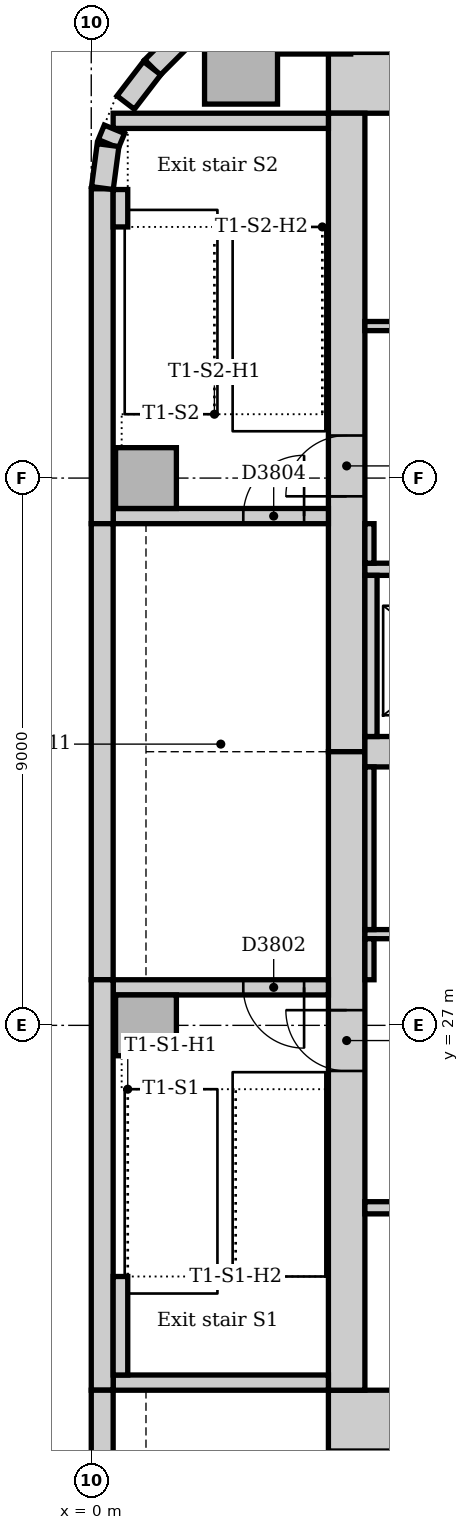
"""IFC4 building model, lengths in metres.
Left out: names, types, materials, properties, quantities, classifications, styles, units other than length and angle.
Written with IfcOpenShell. Run it as: python <this file> out.ifc"""

import sys

from ifc_helpers import new_model, si_unit, direction, frame, frame_2d, origin, origin_2d, place, context, subcontext, project, spatial, rectangle, extrude, element, fill, save


model = new_model("IFC4")
c1 = context("Model", 3, precision=1e-05, world=origin(), true_north=direction((0.0, 1.0)))
c2 = subcontext(c1, "Body", "Model", "MODEL_VIEW")
j1 = project(units=[si_unit("LENGTHUNIT", "METRE"), si_unit("PLANEANGLEUNIT", "RADIAN")], contexts=[c1])
p1 = place(None, origin())
s1 = spatial("IfcSite", under=j1, at=p1, CompositionType="ELEMENT")
p2 = place(p1, origin())
s2 = spatial("IfcBuilding", under=s1, at=p2, CompositionType="ELEMENT")
p3 = place(p2, frame((0.0, 0.0, 87.0)))
s3 = spatial("IfcBuildingStorey", under=s2, at=p3, CompositionType="ELEMENT", Elevation=87.0)
for number, where, z_axis, x_axis in (
    (1, (3.9, 20.5, 0.0), (0.0, 0.0, 1.0), (1.0, 0.0, 0.0)),
    (2, (23.5, 42.5, 0.0), (0.0, 0.0, 1.0), (-1.0, 0.0, 0.0)),
):
    element("IfcWall", number, at=place(p3, frame(where, z_axis=z_axis, x_axis=x_axis)), inside=s3, PredefinedType="SOLIDWALL", context=c2, shape_type="SweptSolid", body=[
        extrude(rectangle(XDim=19.6, YDim=1.0, at=frame_2d((9.8, 0.0))), origin(), (0.0, 0.0, 1.0), 4.0),
    ])
p4 = place(p3, frame((4.2, 42.0, 0.0), z_axis=(0.0, 0.0, 1.0), x_axis=(0.0, -1.0, 0.0)))
e3 = element("IfcWall", 3, at=p4, inside=s3, PredefinedType="SOLIDWALL", context=c2, shape_type="SweptSolid", body=[
    extrude(rectangle(XDim=10.5, YDim=0.6, at=frame_2d((5.25, 0.0))), origin(), (0.0, 0.0, 1.0), 4.0),
])
p5 = place(p4, frame((5.3, 0.0, 0.0)))
e4 = element("IfcOpeningElement", 4, at=p5, cuts=e3, PredefinedType="OPENING", context=c2, shape_type="SweptSolid", body=[
    extrude(rectangle(XDim=1.0, YDim=2.1, at=frame_2d((0.5, 1.05))), frame((0.0, 0.31, 0.0), z_axis=(0.0, -1.0, 0.0), x_axis=(1.0, 0.0, 0.0)), (0.0, 0.0, 1.0), 0.62),
])
p6 = place(p3, frame((4.2, 31.5, 0.0), z_axis=(0.0, 0.0, 1.0), x_axis=(0.0, -1.0, 0.0)))
e5 = element("IfcWall", 5, at=p6, inside=s3, PredefinedType="SOLIDWALL", context=c2, shape_type="SweptSolid", body=[
    extrude(rectangle(XDim=10.5, YDim=0.6, at=frame_2d((5.25, 0.0))), origin(), (0.0, 0.0, 1.0), 4.0),
])
p7 = place(p6, frame((4.25, 0.0, 0.0)))
e6 = element("IfcOpeningElement", 6, at=p7, cuts=e5, PredefinedType="OPENING", context=c2, shape_type="SweptSolid", body=[
    extrude(rectangle(XDim=1.0, YDim=2.1, at=frame_2d((0.5, 1.05))), frame((0.0, 0.31, 0.0), z_axis=(0.0, -1.0, 0.0), x_axis=(1.0, 0.0, 0.0)), (0.0, 0.0, 1.0), 0.62),
])
p8 = place(p3, frame((4.5, 31.5, 0.0), z_axis=(0.0, 0.0, 1.0), x_axis=(1.0, 0.0, 0.0)))
e7 = element("IfcWall", 7, at=p8, inside=s3, PredefinedType="SOLIDWALL", context=c2, shape_type="SweptSolid", body=[
    extrude(rectangle(XDim=18.0, YDim=0.5, at=frame_2d((9.0, 0.0))), origin(), (0.0, 0.0, 1.0), 4.0),
])
p9 = place(p3, frame((0.36, 21.125, 0.0), z_axis=(0.0, 0.0, 1.0), x_axis=(1.0, 0.0, 0.0)))
e8 = element("IfcWall", 8, at=p9, inside=s3, PredefinedType="SOLIDWALL", context=c2, shape_type="SweptSolid", body=[
    extrude(rectangle(XDim=3.54, YDim=0.25, at=frame_2d((1.77, 0.0))), origin(), (0.0, 0.0, 1.0), 4.0),
])
p10 = place(p3, frame((3.9, 27.625, 0.0), z_axis=(0.0, 0.0, 1.0), x_axis=(-1.0, 0.0, 0.0)))
e9 = element("IfcWall", 9, at=p10, inside=s3, PredefinedType="SOLIDWALL", context=c2, shape_type="SweptSolid", body=[
    extrude(rectangle(XDim=3.54, YDim=0.25, at=frame_2d((1.77, 0.0))), origin(), (0.0, 0.0, 1.0), 4.0),
])
p11 = place(p10, frame((0.4, 0.0, 0.0)))
e10 = element("IfcOpeningElement", 10, at=p11, cuts=e9, PredefinedType="OPENING", context=c2, shape_type="SweptSolid", body=[
    extrude(rectangle(XDim=1.0, YDim=2.1, at=frame_2d((0.5, 1.05))), frame((0.0, 0.135, 0.0), z_axis=(0.0, -1.0, 0.0), x_axis=(1.0, 0.0, 0.0)), (0.0, 0.0, 1.0), 0.27),
])
p12 = place(p3, frame((0.36, 35.375, 0.0), z_axis=(0.0, 0.0, 1.0), x_axis=(1.0, 0.0, 0.0)))
e11 = element("IfcWall", 11, at=p12, inside=s3, PredefinedType="SOLIDWALL", context=c2, shape_type="SweptSolid", body=[
    extrude(rectangle(XDim=3.54, YDim=0.25, at=frame_2d((1.77, 0.0))), origin(), (0.0, 0.0, 1.0), 4.0),
])
p13 = place(p12, frame((2.14, 0.0, 0.0)))
e12 = element("IfcOpeningElement", 12, at=p13, cuts=e11, PredefinedType="OPENING", context=c2, shape_type="SweptSolid", body=[
    extrude(rectangle(XDim=1.0, YDim=2.1, at=frame_2d((0.5, 1.05))), frame((0.0, 0.135, 0.0), z_axis=(0.0, -1.0, 0.0), x_axis=(1.0, 0.0, 0.0)), (0.0, 0.0, 1.0), 0.27),
])
p14 = place(p3, frame((3.9, 41.875, 0.0), z_axis=(0.0, 0.0, 1.0), x_axis=(-1.0, 0.0, 0.0)))
e13 = element("IfcWall", 13, at=p14, inside=s3, PredefinedType="SOLIDWALL", context=c2, shape_type="SweptSolid", body=[
    extrude(rectangle(XDim=3.54, YDim=0.25, at=frame_2d((1.77, 0.0))), origin(), (0.0, 0.0, 1.0), 4.0),
])
for number, where, z_axis, x_axis in (
    (14, (3.667, 43.574, 0.0), (0.0, 0.0, 1.0), (1.0, 0.0, 0.0)),
    (15, (2.463, 42.75, 0.0), (0.0, 0.0, 1.0), (1.0, 0.0, 0.0)),
):
    element("IfcColumn", number, at=place(p3, frame(where, z_axis=z_axis, x_axis=x_axis)), inside=s3, PredefinedType="COLUMN", context=c2, shape_type="SweptSolid", body=[
        extrude(rectangle(XDim=1.2, YDim=1.2, at=origin_2d()), origin(), (0.0, 0.0, 1.0), 3.85),
    ])
for number, where, z_axis, x_axis in (
    (16, (0.9, 27.0, 0.0), (0.0, 0.0, 1.0), (1.0, 0.0, 0.0)),
    (17, (0.9, 36.0, 0.0), (0.0, 0.0, 1.0), (1.0, 0.0, 0.0)),
):
    element("IfcColumn", number, at=place(p3, frame(where, z_axis=z_axis, x_axis=x_axis)), inside=s3, PredefinedType="COLUMN", context=c2, shape_type="SweptSolid", body=[
        extrude(rectangle(XDim=1.0, YDim=1.0, at=origin_2d()), origin(), (0.0, 0.0, 1.0), 4.0),
    ])
p15 = place(p3, frame((2.249, 43.994, 0.0), z_axis=(0.0, 0.0, 1.0), x_axis=(-0.707106781187, -0.707106781187, 0.0)))
e18 = element("IfcWall", 18, at=p15, inside=s3, PredefinedType="STANDARD", context=c2, shape_type="SweptSolid", body=[
    extrude(rectangle(XDim=1.757, YDim=0.36, at=frame_2d((0.879, 0.0))), origin(), (0.0, 0.0, 1.0), 3.85),
])
p16 = place(p3, frame((0.18, 40.757, 0.0), z_axis=(0.0, 0.0, 1.0), x_axis=(0.0, -1.0, 0.0)))
e19 = element("IfcWall", 19, at=p16, inside=s3, PredefinedType="STANDARD", context=c2, shape_type="SweptSolid", body=[
    extrude(rectangle(XDim=5.507, YDim=0.36, at=frame_2d((2.754, 0.0))), origin(), (0.0, 0.0, 1.0), 3.85),
])
p17 = place(p3, frame((0.18, 35.25, 0.0), z_axis=(0.0, 0.0, 1.0), x_axis=(0.0, -1.0, 0.0)))
e20 = element("IfcWall", 20, at=p17, inside=s3, PredefinedType="STANDARD", context=c2, shape_type="SweptSolid", body=[
    extrude(rectangle(XDim=7.5, YDim=0.36, at=frame_2d((3.75, 0.0))), origin(), (0.0, 0.0, 1.0), 3.85),
])
p18 = place(p3, frame((0.18, 27.75, 0.0), z_axis=(0.0, 0.0, 1.0), x_axis=(0.0, -1.0, 0.0)))
e21 = element("IfcWall", 21, at=p18, inside=s3, PredefinedType="STANDARD", context=c2, shape_type="SweptSolid", body=[
    extrude(rectangle(XDim=6.75, YDim=0.36, at=frame_2d((3.375, 0.0))), origin(), (0.0, 0.0, 1.0), 3.85),
])
p19 = place(p3, frame((0.18, 21.0, 0.0), z_axis=(0.0, 0.0, 1.0), x_axis=(0.0, -1.0, 0.0)))
e22 = element("IfcWall", 22, at=p19, inside=s3, PredefinedType="STANDARD", context=c2, shape_type="SweptSolid", body=[
    extrude(rectangle(XDim=16.757, YDim=0.36, at=frame_2d((8.379, 0.0))), origin(), (0.0, 0.0, 1.0), 3.85),
])
p20 = place(p19, frame((1.35, 0.0, 0.9)))
e23 = element("IfcOpeningElement", 23, at=p20, cuts=e22, PredefinedType="OPENING", context=c2, shape_type="SweptSolid", body=[
    extrude(rectangle(XDim=3.3, YDim=1.6, at=frame_2d((1.65, 0.8))), frame((0.0, 0.19, 0.0), z_axis=(0.0, -1.0, 0.0), x_axis=(1.0, 0.0, 0.0)), (0.0, 0.0, 1.0), 0.38),
])
p21 = place(p19, frame((5.85, 0.0, 0.9)))
e24 = element("IfcOpeningElement", 24, at=p21, cuts=e22, PredefinedType="OPENING", context=c2, shape_type="SweptSolid", body=[
    extrude(rectangle(XDim=3.3, YDim=1.6, at=frame_2d((1.65, 0.8))), frame((0.0, 0.19, 0.0), z_axis=(0.0, -1.0, 0.0), x_axis=(1.0, 0.0, 0.0)), (0.0, 0.0, 1.0), 0.38),
])
p22 = place(p19, frame((10.35, 0.0, 0.9)))
e25 = element("IfcOpeningElement", 25, at=p22, cuts=e22, PredefinedType="OPENING", context=c2, shape_type="SweptSolid", body=[
    extrude(rectangle(XDim=3.3, YDim=1.6, at=frame_2d((1.65, 0.8))), frame((0.0, 0.19, 0.0), z_axis=(0.0, -1.0, 0.0), x_axis=(1.0, 0.0, 0.0)), (0.0, 0.0, 1.0), 0.38),
])
p23 = place(p3, frame((1.0, 42.741, 0.0), z_axis=(0.0, 0.0, 1.0), x_axis=(-0.608802368033, -0.793321924995, 0.0)))
e26 = element("IfcWall", 26, at=p23, inside=s3, PredefinedType="STANDARD", context=c2, shape_type="SweptSolid", body=[
    extrude(rectangle(XDim=0.713, YDim=0.36, at=frame_2d((0.357, 0.0))), origin(), (0.0, 0.0, 1.0), 3.85),
])
p24 = place(p3, frame((0.381, 41.736, 0.0), z_axis=(0.0, 0.0, 1.0), x_axis=(-0.382773360986, -0.923842277729, 0.0)))
e27 = element("IfcWall", 27, at=p24, inside=s3, PredefinedType="STANDARD", context=c2, shape_type="SweptSolid", body=[
    extrude(rectangle(XDim=0.258, YDim=0.36, at=frame_2d((0.129, 0.0))), origin(), (0.0, 0.0, 1.0), 3.85),
])
p25 = place(p3, frame((0.276, 41.476, 0.0), z_axis=(0.0, 0.0, 1.0), x_axis=(-0.13055608231, -0.99144092581, 0.0)))
e28 = element("IfcWall", 28, at=p25, inside=s3, PredefinedType="STANDARD", context=c2, shape_type="SweptSolid", body=[
    extrude(rectangle(XDim=0.713, YDim=0.36, at=frame_2d((0.356, 0.0))), origin(), (0.0, 0.0, 1.0), 3.85),
])
p26 = place(p3, frame((0.48, 21.25, 0.0), z_axis=(0.0, 0.0, 1.0), x_axis=(0.0, 1.0, 0.0)))
e29 = element("IfcWall", 29, at=p26, inside=s3, PredefinedType="STANDARD", context=c2, shape_type="SweptSolid", body=[
    extrude(rectangle(XDim=1.62, YDim=0.24, at=frame_2d((0.81, 0.0))), origin(), (0.0, 0.0, 1.0), 4.0),
])
p27 = place(p3, frame((0.48, 40.13, 0.0), z_axis=(0.0, 0.0, 1.0), x_axis=(0.0, 1.0, 0.0)))
e30 = element("IfcWall", 30, at=p27, inside=s3, PredefinedType="STANDARD", context=c2, shape_type="SweptSolid", body=[
    extrude(rectangle(XDim=0.615, YDim=0.24, at=frame_2d((0.307, 0.0))), origin(), (0.0, 0.0, 1.0), 4.0),
])
p28 = place(p3, frame((4.5, 24.0, 0.0), z_axis=(0.0, 0.0, 1.0), x_axis=(1.0, 0.0, 0.0)))
e31 = element("IfcWall", 31, at=p28, inside=s3, PredefinedType="PARTITIONING", context=c2, shape_type="SweptSolid", body=[
    extrude(rectangle(XDim=18.0, YDim=0.2, at=frame_2d((9.0, 0.0))), origin(), (0.0, 0.0, 1.0), 3.85),
])
p29 = place(p28, frame((0.95, 0.0, 0.0)))
e32 = element("IfcOpeningElement", 32, at=p29, cuts=e31, PredefinedType="OPENING", context=c2, shape_type="SweptSolid", body=[
    extrude(rectangle(XDim=1.1, YDim=2.1, at=frame_2d((0.55, 1.05))), frame((0.0, 0.11, 0.0), z_axis=(0.0, -1.0, 0.0), x_axis=(1.0, 0.0, 0.0)), (0.0, 0.0, 1.0), 0.22),
])
p30 = place(p28, frame((3.95, 0.0, 0.0)))
e33 = element("IfcOpeningElement", 33, at=p30, cuts=e31, PredefinedType="OPENING", context=c2, shape_type="SweptSolid", body=[
    extrude(rectangle(XDim=1.1, YDim=2.1, at=frame_2d((0.55, 1.05))), frame((0.0, 0.11, 0.0), z_axis=(0.0, -1.0, 0.0), x_axis=(1.0, 0.0, 0.0)), (0.0, 0.0, 1.0), 0.22),
])
p31 = place(p28, frame((6.95, 0.0, 0.0)))
e34 = element("IfcOpeningElement", 34, at=p31, cuts=e31, PredefinedType="OPENING", context=c2, shape_type="SweptSolid", body=[
    extrude(rectangle(XDim=1.1, YDim=2.1, at=frame_2d((0.55, 1.05))), frame((0.0, 0.11, 0.0), z_axis=(0.0, -1.0, 0.0), x_axis=(1.0, 0.0, 0.0)), (0.0, 0.0, 1.0), 0.22),
])
p32 = place(p28, frame((9.95, 0.0, 0.0)))
e35 = element("IfcOpeningElement", 35, at=p32, cuts=e31, PredefinedType="OPENING", context=c2, shape_type="SweptSolid", body=[
    extrude(rectangle(XDim=1.1, YDim=2.1, at=frame_2d((0.55, 1.05))), frame((0.0, 0.11, 0.0), z_axis=(0.0, -1.0, 0.0), x_axis=(1.0, 0.0, 0.0)), (0.0, 0.0, 1.0), 0.22),
])
p33 = place(p28, frame((12.95, 0.0, 0.0)))
e36 = element("IfcOpeningElement", 36, at=p33, cuts=e31, PredefinedType="OPENING", context=c2, shape_type="SweptSolid", body=[
    extrude(rectangle(XDim=1.1, YDim=2.1, at=frame_2d((0.55, 1.05))), frame((0.0, 0.11, 0.0), z_axis=(0.0, -1.0, 0.0), x_axis=(1.0, 0.0, 0.0)), (0.0, 0.0, 1.0), 0.22),
])
p34 = place(p28, frame((15.95, 0.0, 0.0)))
e37 = element("IfcOpeningElement", 37, at=p34, cuts=e31, PredefinedType="OPENING", context=c2, shape_type="SweptSolid", body=[
    extrude(rectangle(XDim=1.1, YDim=2.1, at=frame_2d((0.55, 1.05))), frame((0.0, 0.11, 0.0), z_axis=(0.0, -1.0, 0.0), x_axis=(1.0, 0.0, 0.0)), (0.0, 0.0, 1.0), 0.22),
])
p35 = place(p3, frame((4.5, 34.5, 0.0), z_axis=(0.0, 0.0, 1.0), x_axis=(1.0, 0.0, 0.0)))
e38 = element("IfcWall", 38, at=p35, inside=s3, PredefinedType="PARTITIONING", context=c2, shape_type="SweptSolid", body=[
    extrude(rectangle(XDim=18.0, YDim=0.2, at=frame_2d((9.0, 0.0))), origin(), (0.0, 0.0, 1.0), 3.85),
])
p36 = place(p35, frame((0.95, 0.0, 0.0)))
e39 = element("IfcOpeningElement", 39, at=p36, cuts=e38, PredefinedType="OPENING", context=c2, shape_type="SweptSolid", body=[
    extrude(rectangle(XDim=1.1, YDim=2.1, at=frame_2d((0.55, 1.05))), frame((0.0, 0.11, 0.0), z_axis=(0.0, -1.0, 0.0), x_axis=(1.0, 0.0, 0.0)), (0.0, 0.0, 1.0), 0.22),
])
p37 = place(p35, frame((3.95, 0.0, 0.0)))
e40 = element("IfcOpeningElement", 40, at=p37, cuts=e38, PredefinedType="OPENING", context=c2, shape_type="SweptSolid", body=[
    extrude(rectangle(XDim=1.1, YDim=2.1, at=frame_2d((0.55, 1.05))), frame((0.0, 0.11, 0.0), z_axis=(0.0, -1.0, 0.0), x_axis=(1.0, 0.0, 0.0)), (0.0, 0.0, 1.0), 0.22),
])
p38 = place(p35, frame((12.95, 0.0, 0.0)))
e41 = element("IfcOpeningElement", 41, at=p38, cuts=e38, PredefinedType="OPENING", context=c2, shape_type="SweptSolid", body=[
    extrude(rectangle(XDim=1.1, YDim=2.1, at=frame_2d((0.55, 1.05))), frame((0.0, 0.11, 0.0), z_axis=(0.0, -1.0, 0.0), x_axis=(1.0, 0.0, 0.0)), (0.0, 0.0, 1.0), 0.22),
])
p39 = place(p35, frame((15.95, 0.0, 0.0)))
e42 = element("IfcOpeningElement", 42, at=p39, cuts=e38, PredefinedType="OPENING", context=c2, shape_type="SweptSolid", body=[
    extrude(rectangle(XDim=1.1, YDim=2.1, at=frame_2d((0.55, 1.05))), frame((0.0, 0.11, 0.0), z_axis=(0.0, -1.0, 0.0), x_axis=(1.0, 0.0, 0.0)), (0.0, 0.0, 1.0), 0.22),
])
p40 = place(p3, frame((4.6, 31.75, 0.0), z_axis=(0.0, 0.0, 1.0), x_axis=(0.0, 1.0, 0.0)))
e43 = element("IfcWall", 43, at=p40, inside=s3, PredefinedType="PARTITIONING", context=c2, shape_type="SweptSolid", body=[
    extrude(rectangle(XDim=2.65, YDim=0.2, at=frame_2d((1.325, 0.0))), origin(), (0.0, 0.0, 1.0), 3.85),
])
p41 = place(p3, frame((4.5, 28.5, 0.0), z_axis=(0.0, 0.0, 1.0), x_axis=(1.0, 0.0, 0.0)))
e44 = element("IfcWall", 44, at=p41, inside=s3, PredefinedType="PARTITIONING", context=c2, shape_type="SweptSolid", body=[
    extrude(rectangle(XDim=18.0, YDim=0.15, at=frame_2d((9.0, 0.0))), origin(), (0.0, 0.0, 1.0), 3.85),
])
p42 = place(p41, frame((1.85, 0.0, 0.0)))
e45 = element("IfcOpeningElement", 45, at=p42, cuts=e44, PredefinedType="OPENING", context=c2, shape_type="SweptSolid", body=[
    extrude(rectangle(XDim=0.9, YDim=2.1, at=frame_2d((0.45, 1.05))), frame((0.0, 0.085, 0.0), z_axis=(0.0, -1.0, 0.0), x_axis=(1.0, 0.0, 0.0)), (0.0, 0.0, 1.0), 0.17),
])
p43 = place(p41, frame((6.3, 0.0, 0.0)))
e46 = element("IfcOpeningElement", 46, at=p43, cuts=e44, PredefinedType="OPENING", context=c2, shape_type="SweptSolid", body=[
    extrude(rectangle(XDim=0.9, YDim=2.1, at=frame_2d((0.45, 1.05))), frame((0.0, 0.085, 0.0), z_axis=(0.0, -1.0, 0.0), x_axis=(1.0, 0.0, 0.0)), (0.0, 0.0, 1.0), 0.17),
])
p44 = place(p41, frame((12.95, 0.0, 0.0)))
e47 = element("IfcOpeningElement", 47, at=p44, cuts=e44, PredefinedType="OPENING", context=c2, shape_type="SweptSolid", body=[
    extrude(rectangle(XDim=0.9, YDim=2.1, at=frame_2d((0.45, 1.05))), frame((0.0, 0.085, 0.0), z_axis=(0.0, -1.0, 0.0), x_axis=(1.0, 0.0, 0.0)), (0.0, 0.0, 1.0), 0.17),
])
p45 = place(p3, frame((4.5, 38.5, 0.0), z_axis=(0.0, 0.0, 1.0), x_axis=(1.0, 0.0, 0.0)))
e48 = element("IfcWall", 48, at=p45, inside=s3, PredefinedType="PARTITIONING", context=c2, shape_type="SweptSolid", body=[
    extrude(rectangle(XDim=11.9, YDim=0.15, at=frame_2d((5.95, 0.0))), origin(), (0.0, 0.0, 1.0), 3.85),
])
p46 = place(p45, frame((1.85, 0.0, 0.0)))
e49 = element("IfcOpeningElement", 49, at=p46, cuts=e48, PredefinedType="OPENING", context=c2, shape_type="SweptSolid", body=[
    extrude(rectangle(XDim=0.9, YDim=2.1, at=frame_2d((0.45, 1.05))), frame((0.0, 0.085, 0.0), z_axis=(0.0, -1.0, 0.0), x_axis=(1.0, 0.0, 0.0)), (0.0, 0.0, 1.0), 0.17),
])
p47 = place(p45, frame((4.8, 0.0, 0.0)))
e50 = element("IfcOpeningElement", 50, at=p47, cuts=e48, PredefinedType="OPENING", context=c2, shape_type="SweptSolid", body=[
    extrude(rectangle(XDim=0.9, YDim=2.1, at=frame_2d((0.45, 1.05))), frame((0.0, 0.085, 0.0), z_axis=(0.0, -1.0, 0.0), x_axis=(1.0, 0.0, 0.0)), (0.0, 0.0, 1.0), 0.17),
])
p48 = place(p45, frame((7.05, 0.0, 0.0)))
e51 = element("IfcOpeningElement", 51, at=p48, cuts=e48, PredefinedType="OPENING", context=c2, shape_type="SweptSolid", body=[
    extrude(rectangle(XDim=0.9, YDim=2.1, at=frame_2d((0.45, 1.05))), frame((0.0, 0.085, 0.0), z_axis=(0.0, -1.0, 0.0), x_axis=(1.0, 0.0, 0.0)), (0.0, 0.0, 1.0), 0.17),
])
p49 = place(p45, frame((9.95, 0.0, 0.0)))
e52 = element("IfcOpeningElement", 52, at=p49, cuts=e48, PredefinedType="OPENING", context=c2, shape_type="SweptSolid", body=[
    extrude(rectangle(XDim=0.8, YDim=2.1, at=frame_2d((0.4, 1.05))), frame((0.0, 0.085, 0.0), z_axis=(0.0, -1.0, 0.0), x_axis=(1.0, 0.0, 0.0)), (0.0, 0.0, 1.0), 0.17),
])
p50 = place(p3, frame((4.575, 27.75, 0.0), z_axis=(0.0, 0.0, 1.0), x_axis=(0.0, 1.0, 0.0)))
e53 = element("IfcWall", 53, at=p50, inside=s3, PredefinedType="PARTITIONING", context=c2, shape_type="SweptSolid", body=[
    extrude(rectangle(XDim=0.675, YDim=0.15, at=frame_2d((0.338, 0.0))), origin(), (0.0, 0.0, 1.0), 3.85),
])
p51 = place(p3, frame((4.575, 28.575, 0.0), z_axis=(0.0, 0.0, 1.0), x_axis=(0.0, 1.0, 0.0)))
e54 = element("IfcWall", 54, at=p51, inside=s3, PredefinedType="PARTITIONING", context=c2, shape_type="SweptSolid", body=[
    extrude(rectangle(XDim=2.675, YDim=0.15, at=frame_2d((1.337, 0.0))), origin(), (0.0, 0.0, 1.0), 3.85),
])
p52 = place(p3, frame((4.575, 34.6, 0.0), z_axis=(0.0, 0.0, 1.0), x_axis=(0.0, 1.0, 0.0)))
e55 = element("IfcWall", 55, at=p52, inside=s3, PredefinedType="PARTITIONING", context=c2, shape_type="SweptSolid", body=[
    extrude(rectangle(XDim=0.65, YDim=0.15, at=frame_2d((0.325, 0.0))), origin(), (0.0, 0.0, 1.0), 3.85),
])
p53 = place(p7, frame((1.0, 0.0, 0.0), z_axis=(0.0, 0.0, 1.0), x_axis=(-1.0, 0.0, 0.0)))
e56 = element("IfcDoor", 56, at=p53, inside=s3, OperationType="SINGLE_SWING_RIGHT", PredefinedType="DOOR", context=c2, shape_type="SweptSolid", body=[
    extrude(rectangle(XDim=1.0, YDim=2.1, at=frame_2d((0.5, 1.05))), frame((0.0, 0.025, 0.0), z_axis=(0.0, -1.0, 0.0), x_axis=(1.0, 0.0, 0.0)), (0.0, 0.0, 1.0), 0.05),
])
fill(e6, e56)
p54 = place(p11, origin())
e57 = element("IfcDoor", 57, at=p54, inside=s3, OperationType="SINGLE_SWING_LEFT", PredefinedType="DOOR", context=c2, shape_type="SweptSolid", body=[
    extrude(rectangle(XDim=1.0, YDim=2.1, at=frame_2d((0.5, 1.05))), frame((0.0, 0.025, 0.0), z_axis=(0.0, -1.0, 0.0), x_axis=(1.0, 0.0, 0.0)), (0.0, 0.0, 1.0), 0.05),
])
fill(e10, e57)
p55 = place(p5, frame((1.0, 0.0, 0.0), z_axis=(0.0, 0.0, 1.0), x_axis=(-1.0, 0.0, 0.0)))
e58 = element("IfcDoor", 58, at=p55, inside=s3, OperationType="SINGLE_SWING_LEFT", PredefinedType="DOOR", context=c2, shape_type="SweptSolid", body=[
    extrude(rectangle(XDim=1.0, YDim=2.1, at=frame_2d((0.5, 1.05))), frame((0.0, 0.025, 0.0), z_axis=(0.0, -1.0, 0.0), x_axis=(1.0, 0.0, 0.0)), (0.0, 0.0, 1.0), 0.05),
])
fill(e4, e58)
p56 = place(p13, origin())
e59 = element("IfcDoor", 59, at=p56, inside=s3, OperationType="SINGLE_SWING_RIGHT", PredefinedType="DOOR", context=c2, shape_type="SweptSolid", body=[
    extrude(rectangle(XDim=1.0, YDim=2.1, at=frame_2d((0.5, 1.05))), frame((0.0, 0.025, 0.0), z_axis=(0.0, -1.0, 0.0), x_axis=(1.0, 0.0, 0.0)), (0.0, 0.0, 1.0), 0.05),
])
fill(e12, e59)
save(model, sys.argv[1])
